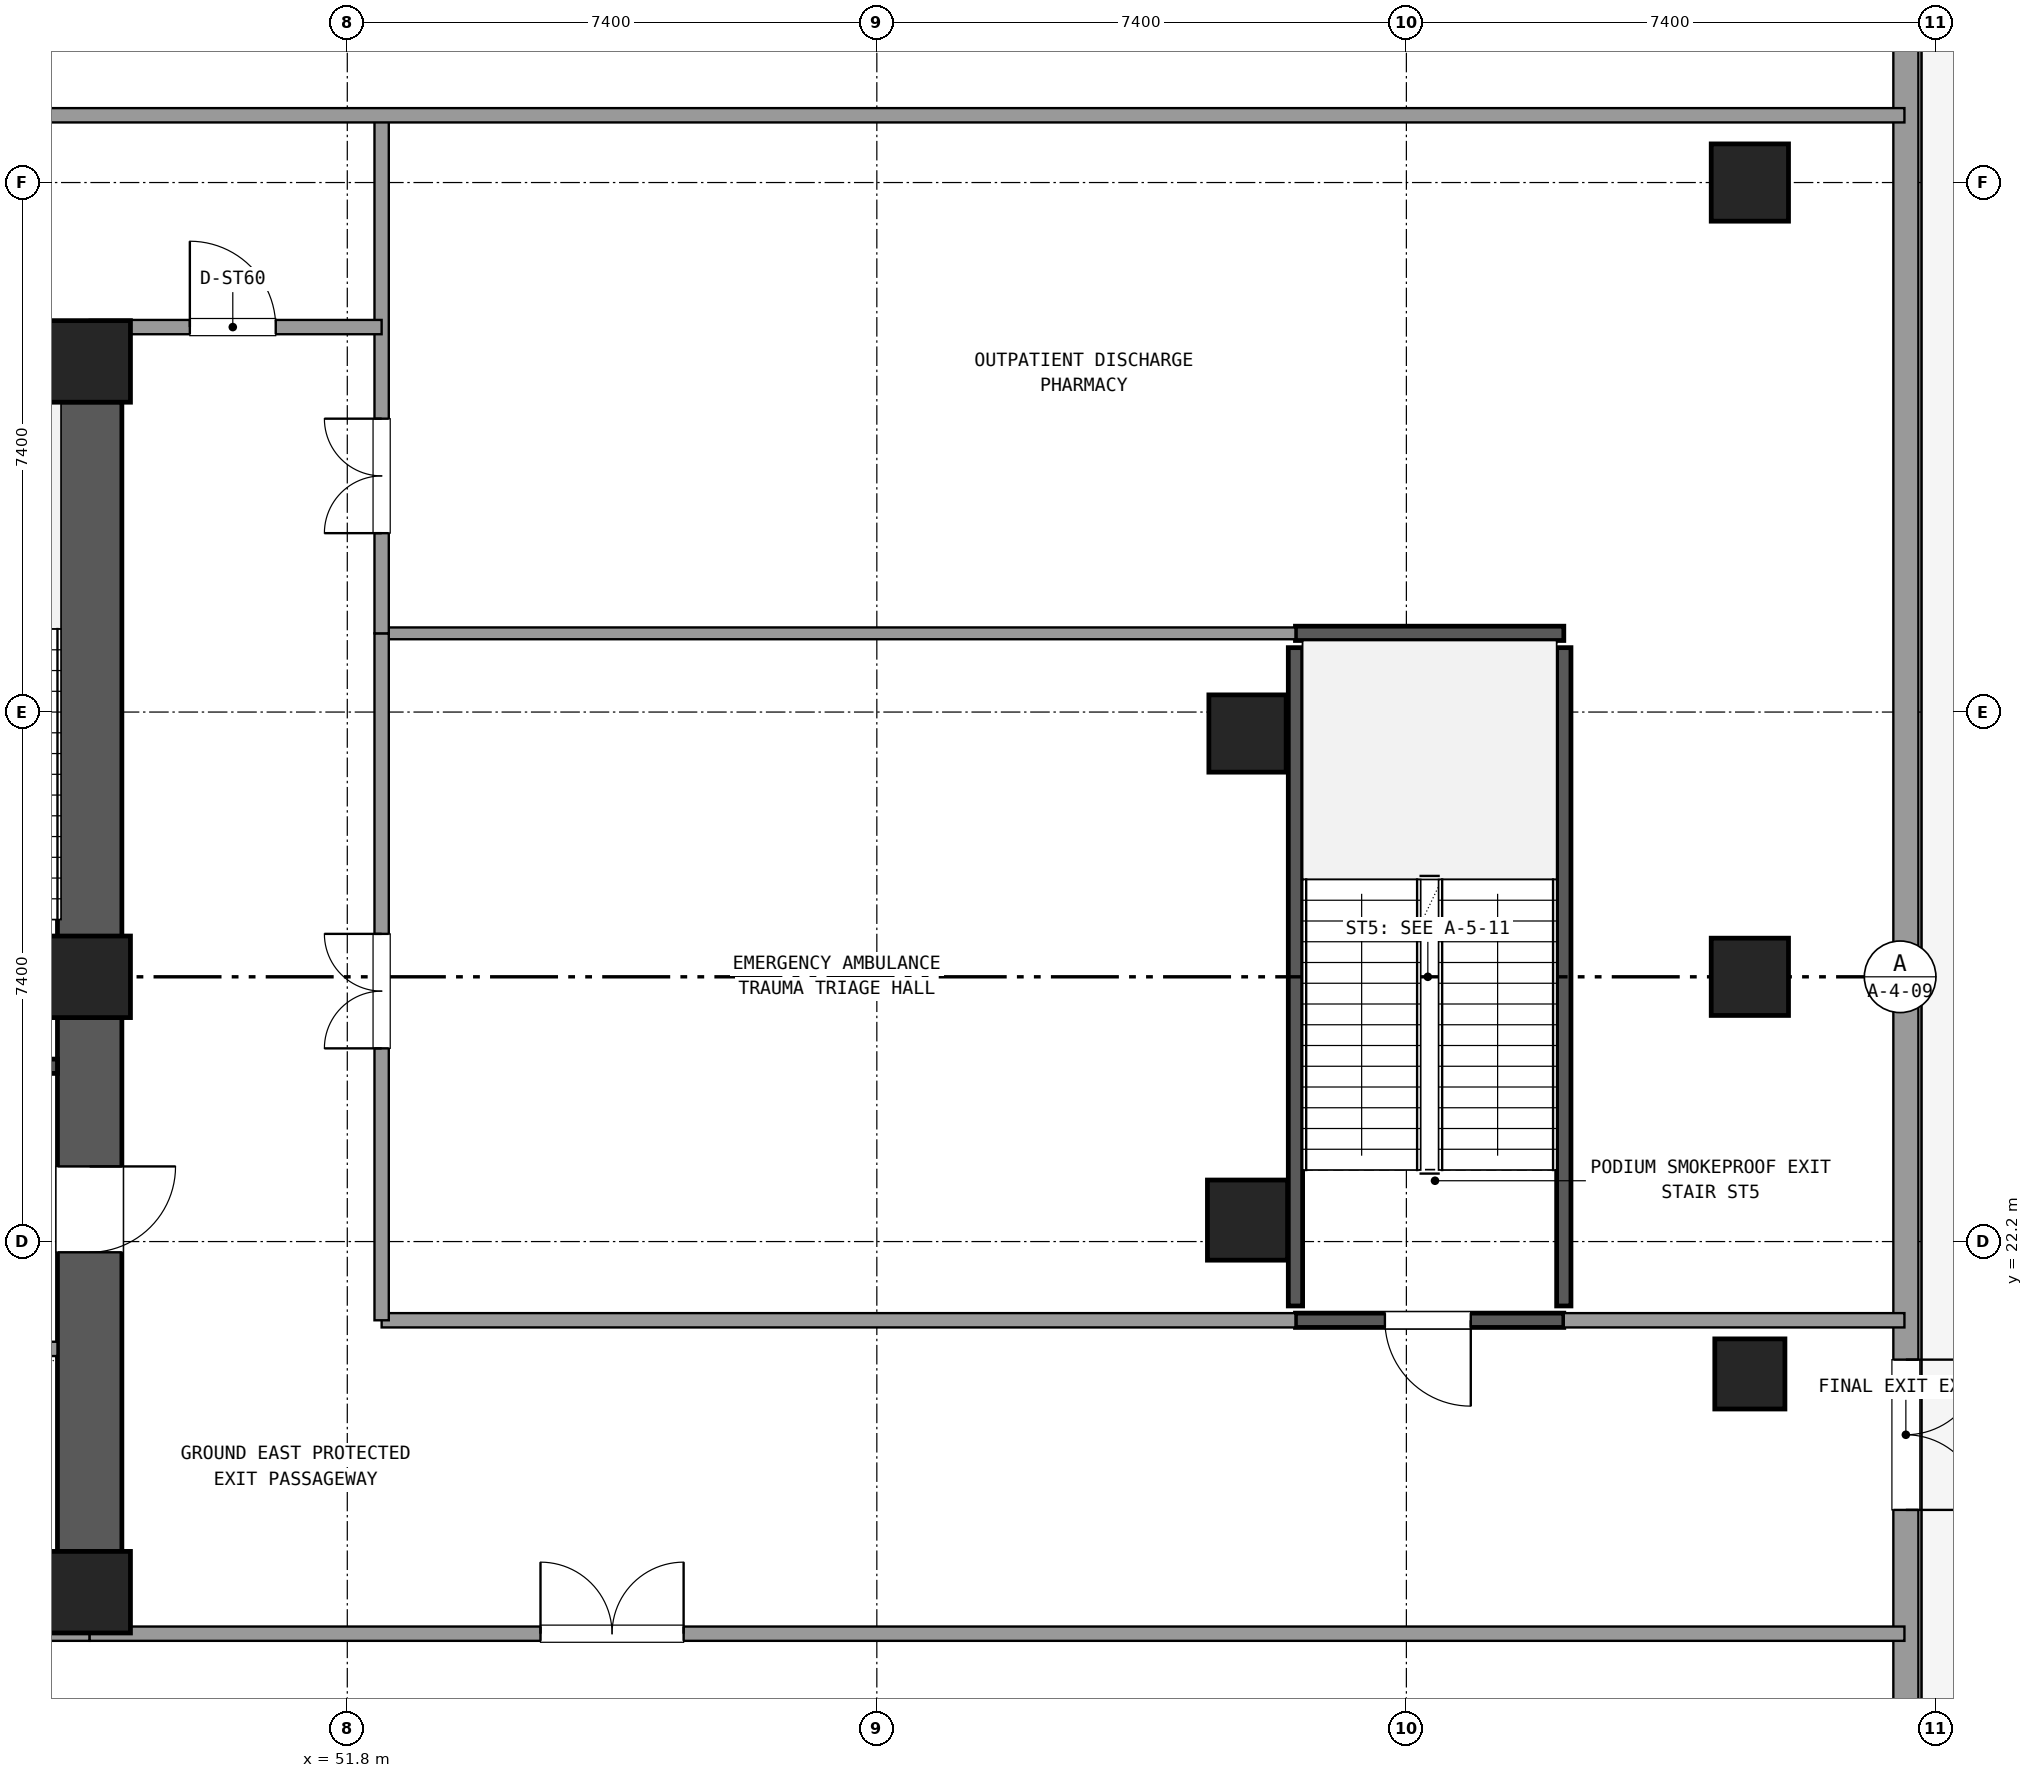
"""IFC4 building model, lengths in metres.
Left out: names, types, materials, properties, quantities, classifications, styles, units other than length and angle.
Written with IfcOpenShell. Run it as: python <this file> out.ifc"""

import sys

from ifc_helpers import new_model, si_unit, direction, frame, frame_2d, origin, origin_2d, place, context, subcontext, project, spatial, rectangle, circle, extrude, element, fill, save


model = new_model("IFC4")
c1 = context("Model", 3, precision=1e-05, world=origin(), true_north=direction((0.0, 1.0)))
c2 = subcontext(c1, "Body", "Model", "MODEL_VIEW")
j1 = project(units=[si_unit("LENGTHUNIT", "METRE"), si_unit("PLANEANGLEUNIT", "RADIAN")], contexts=[c1])
p1 = place(None, origin())
s1 = spatial("IfcSite", under=j1, at=p1, CompositionType="ELEMENT")
p2 = place(p1, origin())
s2 = spatial("IfcBuilding", under=s1, at=p2, CompositionType="ELEMENT")
p3 = place(p2, origin())
s3 = spatial("IfcBuildingStorey", under=s2, at=p3, CompositionType="ELEMENT", Elevation=0.0)
for number, where, z_axis, x_axis in (
    (1, (48.2, 17.3, 0.0), (0.0, 0.0, 1.0), (1.0, 0.0, 0.0)),
    (2, (48.2, 25.9, 0.0), (0.0, 0.0, 1.0), (1.0, 0.0, 0.0)),
    (3, (48.2, 34.5, 0.0), (0.0, 0.0, 1.0), (1.0, 0.0, 0.0)),
):
    element("IfcColumn", number, at=place(p3, frame(where, z_axis=z_axis, x_axis=x_axis)), inside=s3, PredefinedType="COLUMN", context=c2, shape_type="SweptSolid", body=[
        extrude(rectangle(XDim=1.14, YDim=1.14, at=origin_2d()), origin(), (0.0, 0.0, 1.0), 5.4),
    ])
p4 = place(p3, frame((48.2, 17.865, 0.0), z_axis=(0.0, 0.0, 1.0), x_axis=(0.0, 1.0, 0.0)))
e4 = element("IfcWall", 4, at=p4, inside=s3, PredefinedType="SHEAR", context=c2, shape_type="SweptSolid", body=[
    extrude(rectangle(XDim=7.47, YDim=0.9, at=frame_2d((3.735, 0.0))), origin(), (0.0, 0.0, 1.0), 5.1),
])
p5 = place(p4, frame((4.185, 0.0, 0.0)))
e5 = element("IfcOpeningElement", 5, at=p5, cuts=e4, PredefinedType="OPENING", context=c2, shape_type="SweptSolid", body=[
    extrude(rectangle(XDim=1.2, YDim=2.15, at=frame_2d((0.6, 1.075))), frame((0.0, 0.46, 0.0), z_axis=(0.0, -1.0, 0.0), x_axis=(1.0, 0.0, 0.0)), (0.0, 0.0, 1.0), 0.92),
])
p6 = place(p3, frame((48.2, 26.465, 0.0), z_axis=(0.0, 0.0, 1.0), x_axis=(0.0, 1.0, 0.0)))
e6 = element("IfcWall", 6, at=p6, inside=s3, PredefinedType="SHEAR", context=c2, shape_type="SweptSolid", body=[
    extrude(rectangle(XDim=7.47, YDim=0.9, at=frame_2d((3.735, 0.0))), origin(), (0.0, 0.0, 1.0), 5.1),
])
p7 = place(p3, frame((64.38, 22.5, 0.0), z_axis=(0.0, 0.0, 1.0), x_axis=(1.0, 0.0, 0.0)))
e7 = element("IfcColumn", 7, at=p7, inside=s3, PredefinedType="COLUMN", context=c2, shape_type="SweptSolid", body=[
    extrude(circle(Radius=0.56, at=origin_2d()), origin(), (0.0, 0.0, 1.0), 5.4),
])
for number, where, z_axis, x_axis in (
    (8, (64.38, 29.3, 0.0), (0.0, 0.0, 1.0), (1.0, 0.0, 0.0)),
    (9, (71.4, 25.9, 0.0), (0.0, 0.0, 1.0), (1.0, 0.0, 0.0)),
    (10, (71.4, 37.0, 0.0), (0.0, 0.0, 1.0), (1.0, 0.0, 0.0)),
):
    element("IfcColumn", number, at=place(p3, frame(where, z_axis=z_axis, x_axis=x_axis)), inside=s3, PredefinedType="COLUMN", context=c2, shape_type="SweptSolid", body=[
        extrude(rectangle(XDim=1.08, YDim=1.08, at=origin_2d()), origin(), (0.0, 0.0, 1.0), 5.4),
    ])
p8 = place(p3, frame((71.4, 20.35, 0.0), z_axis=(0.0, 0.0, 1.0), x_axis=(1.0, 0.0, 0.0)))
e11 = element("IfcColumn", 11, at=p8, inside=s3, PredefinedType="PILASTER", context=c2, shape_type="SweptSolid", body=[
    extrude(circle(Radius=0.49, at=origin_2d()), origin(), (0.0, 0.0, 1.0), 5.4),
])
p9 = place(p3, frame((73.58, 4.379, 0.0), z_axis=(0.0, 0.0, 1.0), x_axis=(0.0, 1.0, 0.0)))
e12 = element("IfcWall", 12, at=p9, inside=s3, PredefinedType="SOLIDWALL", context=c2, shape_type="SweptSolid", body=[
    extrude(rectangle(XDim=43.042, YDim=0.35, at=frame_2d((21.521, 0.0))), origin(), (0.0, 0.0, 1.0), 4.14),
])
p10 = place(p9, frame((14.071, 0.0, 0.0)))
e13 = element("IfcOpeningElement", 13, at=p10, cuts=e12, PredefinedType="OPENING", context=c2, shape_type="SweptSolid", body=[
    extrude(rectangle(XDim=2.1, YDim=2.4, at=frame_2d((1.05, 1.2))), frame((0.0, 0.185, 0.0), z_axis=(0.0, -1.0, 0.0), x_axis=(1.0, 0.0, 0.0)), (0.0, 0.0, 1.0), 0.37),
])
p11 = place(p9, frame((37.121, 0.0, 0.0)))
e14 = element("IfcOpeningElement", 14, at=p11, cuts=e12, PredefinedType="OPENING", context=c2, shape_type="SweptSolid", body=[
    extrude(rectangle(XDim=3.8, YDim=2.85, at=frame_2d((1.9, 1.425))), frame((0.0, 0.185, 0.0), z_axis=(0.0, -1.0, 0.0), x_axis=(1.0, 0.0, 0.0)), (0.0, 0.0, 1.0), 0.37),
])
p12 = place(p3, frame((43.35, 24.65, 0.0), z_axis=(0.0, 0.0, 1.0), x_axis=(1.0, 0.0, 0.0)))
e15 = element("IfcWall", 15, at=p12, inside=s3, PredefinedType="SHEAR", context=c2, shape_type="SweptSolid", body=[
    extrude(rectangle(XDim=4.4, YDim=0.2, at=frame_2d((2.2, 0.0))), origin(), (0.0, 0.0, 1.0), 5.1),
])
p13 = place(p12, frame((2.0, 0.0, 0.0)))
e16 = element("IfcOpeningElement", 16, at=p13, cuts=e15, PredefinedType="OPENING", context=c2, shape_type="SweptSolid", body=[
    extrude(rectangle(XDim=1.2, YDim=2.15, at=frame_2d((0.6, 1.075))), frame((0.0, 0.11, 0.0), z_axis=(0.0, -1.0, 0.0), x_axis=(1.0, 0.0, 0.0)), (0.0, 0.0, 1.0), 0.22),
])
p14 = place(p3, frame((43.35, 20.7, 0.0), z_axis=(0.0, 0.0, 1.0), x_axis=(1.0, 0.0, 0.0)))
e17 = element("IfcWall", 17, at=p14, inside=s3, PredefinedType="SOLIDWALL", context=c2, shape_type="SweptSolid", body=[
    extrude(rectangle(XDim=4.4, YDim=0.2, at=frame_2d((2.2, 0.0))), origin(), (0.0, 0.0, 1.0), 4.11),
])
p15 = place(p14, frame((2.35, 0.0, 0.0)))
e18 = element("IfcOpeningElement", 18, at=p15, cuts=e17, PredefinedType="OPENING", context=c2, shape_type="SweptSolid", body=[
    extrude(rectangle(XDim=1.2, YDim=2.15, at=frame_2d((0.6, 1.075))), frame((0.0, 0.11, 0.0), z_axis=(0.0, -1.0, 0.0), x_axis=(1.0, 0.0, 0.0)), (0.0, 0.0, 1.0), 0.22),
])
p16 = place(p3, frame((65.05, 21.1, 0.0), z_axis=(0.0, 0.0, 1.0), x_axis=(1.0, 0.0, 0.0)))
e19 = element("IfcWall", 19, at=p16, inside=s3, PredefinedType="SHEAR", context=c2, shape_type="SweptSolid", body=[
    extrude(rectangle(XDim=3.75, YDim=0.2, at=frame_2d((1.875, 0.0))), origin(), (0.0, 0.0, 1.0), 5.1),
])
p17 = place(p16, frame((1.25, 0.0, 0.0)))
e20 = element("IfcOpeningElement", 20, at=p17, cuts=e19, PredefinedType="OPENING", context=c2, shape_type="SweptSolid", body=[
    extrude(rectangle(XDim=1.2, YDim=2.15, at=frame_2d((0.6, 1.075))), frame((0.0, 0.11, 0.0), z_axis=(0.0, -1.0, 0.0), x_axis=(1.0, 0.0, 0.0)), (0.0, 0.0, 1.0), 0.22),
])
p18 = place(p3, frame((65.05, 30.7, 0.0), z_axis=(0.0, 0.0, 1.0), x_axis=(1.0, 0.0, 0.0)))
e21 = element("IfcWall", 21, at=p18, inside=s3, PredefinedType="SHEAR", context=c2, shape_type="SweptSolid", body=[
    extrude(rectangle(XDim=3.75, YDim=0.2, at=frame_2d((1.875, 0.0))), origin(), (0.0, 0.0, 1.0), 5.1),
])
for number, where, z_axis, x_axis in (
    (22, (65.05, 21.3, 0.0), (0.0, 0.0, 1.0), (0.0, 1.0, 0.0)),
    (23, (68.8, 21.3, 0.0), (0.0, 0.0, 1.0), (0.0, 1.0, 0.0)),
):
    element("IfcWall", number, at=place(p3, frame(where, z_axis=z_axis, x_axis=x_axis)), inside=s3, PredefinedType="SHEAR", context=c2, shape_type="SweptSolid", body=[
        extrude(rectangle(XDim=9.2, YDim=0.2, at=frame_2d((4.6, 0.0))), origin(), (0.0, 0.0, 1.0), 5.1),
    ])
p19 = place(p3, frame((25.8, 16.72, 0.0), z_axis=(0.0, 0.0, 1.0), x_axis=(1.0, 0.0, 0.0)))
e24 = element("IfcWall", 24, at=p19, inside=s3, PredefinedType="SOLIDWALL", context=c2, shape_type="SweptSolid", body=[
    extrude(rectangle(XDim=22.4, YDim=0.2, at=frame_2d((11.2, 0.0))), origin(), (0.0, 0.0, 1.0), 4.11),
])
p20 = place(p3, frame((48.2, 16.72, 0.0), z_axis=(0.0, 0.0, 1.0), x_axis=(1.0, 0.0, 0.0)))
e25 = element("IfcWall", 25, at=p20, inside=s3, PredefinedType="SOLIDWALL", context=c2, shape_type="SweptSolid", body=[
    extrude(rectangle(XDim=25.36, YDim=0.2, at=frame_2d((12.68, 0.0))), origin(), (0.0, 0.0, 1.0), 4.11),
])
p21 = place(p20, frame((6.3, 0.0, 0.0)))
e26 = element("IfcOpeningElement", 26, at=p21, cuts=e25, PredefinedType="OPENING", context=c2, shape_type="SweptSolid", body=[
    extrude(rectangle(XDim=2.0, YDim=2.2, at=frame_2d((1.0, 1.1))), frame((0.0, 0.11, 0.0), z_axis=(0.0, -1.0, 0.0), x_axis=(1.0, 0.0, 0.0)), (0.0, 0.0, 1.0), 0.22),
])
p22 = place(p3, frame((52.28, 21.1, 0.0), z_axis=(0.0, 0.0, 1.0), x_axis=(1.0, 0.0, 0.0)))
e27 = element("IfcWall", 27, at=p22, inside=s3, PredefinedType="SOLIDWALL", context=c2, shape_type="SweptSolid", body=[
    extrude(rectangle(XDim=12.77, YDim=0.2, at=frame_2d((6.385, 0.0))), origin(), (0.0, 0.0, 1.0), 4.11),
])
p23 = place(p3, frame((68.8, 21.1, 0.0), z_axis=(0.0, 0.0, 1.0), x_axis=(1.0, 0.0, 0.0)))
e28 = element("IfcWall", 28, at=p23, inside=s3, PredefinedType="SOLIDWALL", context=c2, shape_type="SweptSolid", body=[
    extrude(rectangle(XDim=4.76, YDim=0.2, at=frame_2d((2.38, 0.0))), origin(), (0.0, 0.0, 1.0), 4.11),
])
p24 = place(p3, frame((52.28, 30.7, 0.0), z_axis=(0.0, 0.0, 1.0), x_axis=(1.0, 0.0, 0.0)))
e29 = element("IfcWall", 29, at=p24, inside=s3, PredefinedType="PARTITIONING", context=c2, shape_type="SweptSolid", body=[
    extrude(rectangle(XDim=12.77, YDim=0.165, at=frame_2d((6.385, 0.0))), origin(), (0.0, 0.0, 1.0), 4.11),
])
p25 = place(p3, frame((52.28, 21.1, 0.0), z_axis=(0.0, 0.0, 1.0), x_axis=(0.0, 1.0, 0.0)))
e30 = element("IfcWall", 30, at=p25, inside=s3, PredefinedType="SOLIDWALL", context=c2, shape_type="SweptSolid", body=[
    extrude(rectangle(XDim=9.6, YDim=0.2, at=frame_2d((4.8, 0.0))), origin(), (0.0, 0.0, 1.0), 4.11),
])
p26 = place(p25, frame((3.8, 0.0, 0.0)))
e31 = element("IfcOpeningElement", 31, at=p26, cuts=e30, PredefinedType="OPENING", context=c2, shape_type="SweptSolid", body=[
    extrude(rectangle(XDim=1.6, YDim=2.2, at=frame_2d((0.8, 1.1))), frame((0.0, 0.11, 0.0), z_axis=(0.0, -1.0, 0.0), x_axis=(1.0, 0.0, 0.0)), (0.0, 0.0, 1.0), 0.22),
])
p27 = place(p3, frame((52.28, 30.7, 0.0), z_axis=(0.0, 0.0, 1.0), x_axis=(0.0, 1.0, 0.0)))
e32 = element("IfcWall", 32, at=p27, inside=s3, PredefinedType="SOLIDWALL", context=c2, shape_type="SweptSolid", body=[
    extrude(rectangle(XDim=7.24, YDim=0.2, at=frame_2d((3.62, 0.0))), origin(), (0.0, 0.0, 1.0), 4.11),
])
p28 = place(p27, frame((1.4, 0.0, 0.0)))
e33 = element("IfcOpeningElement", 33, at=p28, cuts=e32, PredefinedType="OPENING", context=c2, shape_type="SweptSolid", body=[
    extrude(rectangle(XDim=1.6, YDim=2.2, at=frame_2d((0.8, 1.1))), frame((0.0, 0.11, 0.0), z_axis=(0.0, -1.0, 0.0), x_axis=(1.0, 0.0, 0.0)), (0.0, 0.0, 1.0), 0.22),
])
p29 = place(p3, frame((48.2, 34.98, 0.0), z_axis=(0.0, 0.0, 1.0), x_axis=(1.0, 0.0, 0.0)))
e34 = element("IfcWall", 34, at=p29, inside=s3, PredefinedType="SOLIDWALL", context=c2, shape_type="SweptSolid", body=[
    extrude(rectangle(XDim=4.08, YDim=0.2, at=frame_2d((2.04, 0.0))), origin(), (0.0, 0.0, 1.0), 4.11),
])
p30 = place(p29, frame((1.4, 0.0, 0.0)))
e35 = element("IfcOpeningElement", 35, at=p30, cuts=e34, PredefinedType="OPENING", context=c2, shape_type="SweptSolid", body=[
    extrude(rectangle(XDim=1.2, YDim=2.15, at=frame_2d((0.6, 1.075))), frame((0.0, 0.11, 0.0), z_axis=(0.0, -1.0, 0.0), x_axis=(1.0, 0.0, 0.0)), (0.0, 0.0, 1.0), 0.22),
])
p31 = place(p3, frame((37.0, 37.94, 0.0), z_axis=(0.0, 0.0, 1.0), x_axis=(1.0, 0.0, 0.0)))
e36 = element("IfcWall", 36, at=p31, inside=s3, PredefinedType="SOLIDWALL", context=c2, shape_type="SweptSolid", body=[
    extrude(rectangle(XDim=36.56, YDim=0.2, at=frame_2d((18.28, 0.0))), origin(), (0.0, 0.0, 1.0), 4.11),
])
p32 = place(p31, frame((6.0, 0.0, 0.0)))
e37 = element("IfcOpeningElement", 37, at=p32, cuts=e36, PredefinedType="OPENING", context=c2, shape_type="SweptSolid", body=[
    extrude(rectangle(XDim=2.0, YDim=2.2, at=frame_2d((1.0, 1.1))), frame((0.0, 0.11, 0.0), z_axis=(0.0, -1.0, 0.0), x_axis=(1.0, 0.0, 0.0)), (0.0, 0.0, 1.0), 0.22),
])
p33 = place(p10, frame((2.1, 0.0, 0.0), z_axis=(0.0, 0.0, 1.0), x_axis=(-1.0, 0.0, 0.0)))
e38 = element("IfcDoor", 38, at=p33, inside=s3, OperationType="DOUBLE_DOOR_SINGLE_SWING", PredefinedType="DOOR", context=c2, shape_type="SweptSolid", body=[
    extrude(rectangle(XDim=2.1, YDim=2.4, at=frame_2d((1.05, 1.2))), frame((0.0, 0.025, 0.0), z_axis=(0.0, -1.0, 0.0), x_axis=(1.0, 0.0, 0.0)), (0.0, 0.0, 1.0), 0.05),
])
fill(e13, e38)
p34 = place(p5, frame((1.2, 0.0, 0.0), z_axis=(0.0, 0.0, 1.0), x_axis=(-1.0, 0.0, 0.0)))
e39 = element("IfcDoor", 39, at=p34, inside=s3, OperationType="SINGLE_SWING_RIGHT", PredefinedType="DOOR", context=c2, shape_type="SweptSolid", body=[
    extrude(rectangle(XDim=1.2, YDim=2.15, at=frame_2d((0.6, 1.075))), frame((0.0, 0.025, 0.0), z_axis=(0.0, -1.0, 0.0), x_axis=(1.0, 0.0, 0.0)), (0.0, 0.0, 1.0), 0.05),
])
fill(e5, e39)
p35 = place(p17, frame((1.2, 0.0, 0.0), z_axis=(0.0, 0.0, 1.0), x_axis=(-1.0, 0.0, 0.0)))
e40 = element("IfcDoor", 40, at=p35, inside=s3, OperationType="SINGLE_SWING_RIGHT", PredefinedType="DOOR", context=c2, shape_type="SweptSolid", body=[
    extrude(rectangle(XDim=1.2, YDim=2.15, at=frame_2d((0.6, 1.075))), frame((0.0, 0.025, 0.0), z_axis=(0.0, -1.0, 0.0), x_axis=(1.0, 0.0, 0.0)), (0.0, 0.0, 1.0), 0.05),
])
fill(e20, e40)
p36 = place(p21, origin())
e41 = element("IfcDoor", 41, at=p36, inside=s3, OperationType="DOUBLE_DOOR_SINGLE_SWING", PredefinedType="DOOR", context=c2, shape_type="SweptSolid", body=[
    extrude(rectangle(XDim=2.0, YDim=2.2, at=frame_2d((1.0, 1.1))), frame((0.0, 0.025, 0.0), z_axis=(0.0, -1.0, 0.0), x_axis=(1.0, 0.0, 0.0)), (0.0, 0.0, 1.0), 0.05),
])
fill(e26, e41)
p37 = place(p26, origin())
e42 = element("IfcDoor", 42, at=p37, inside=s3, OperationType="DOUBLE_DOOR_SINGLE_SWING", PredefinedType="DOOR", context=c2, shape_type="SweptSolid", body=[
    extrude(rectangle(XDim=1.6, YDim=2.2, at=frame_2d((0.8, 1.1))), frame((0.0, 0.025, 0.0), z_axis=(0.0, -1.0, 0.0), x_axis=(1.0, 0.0, 0.0)), (0.0, 0.0, 1.0), 0.05),
])
fill(e31, e42)
p38 = place(p28, origin())
e43 = element("IfcDoor", 43, at=p38, inside=s3, OperationType="DOUBLE_DOOR_SINGLE_SWING", PredefinedType="DOOR", context=c2, shape_type="SweptSolid", body=[
    extrude(rectangle(XDim=1.6, YDim=2.2, at=frame_2d((0.8, 1.1))), frame((0.0, 0.025, 0.0), z_axis=(0.0, -1.0, 0.0), x_axis=(1.0, 0.0, 0.0)), (0.0, 0.0, 1.0), 0.05),
])
fill(e33, e43)
p39 = place(p30, origin())
e44 = element("IfcDoor", 44, at=p39, inside=s3, OperationType="SINGLE_SWING_LEFT", PredefinedType="DOOR", context=c2, shape_type="SweptSolid", body=[
    extrude(rectangle(XDim=1.2, YDim=2.15, at=frame_2d((0.6, 1.075))), frame((0.0, 0.025, 0.0), z_axis=(0.0, -1.0, 0.0), x_axis=(1.0, 0.0, 0.0)), (0.0, 0.0, 1.0), 0.05),
])
fill(e35, e44)
save(model, sys.argv[1])
